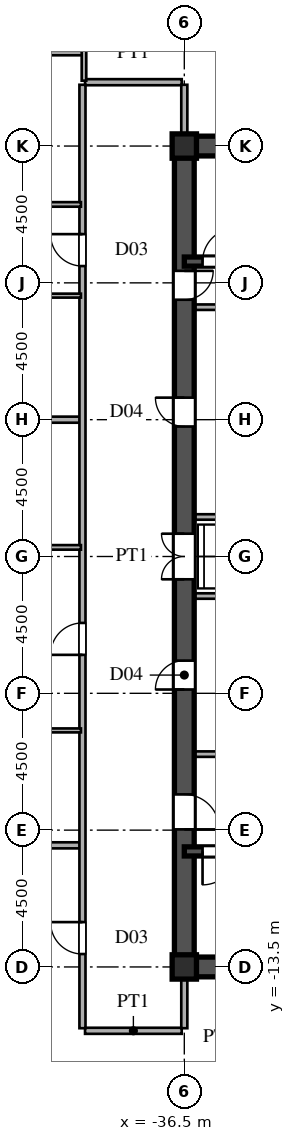
"""IFC4 building model, lengths in metres.
Left out: names, types, materials, properties, quantities, classifications, styles, units other than length and angle.
Written with IfcOpenShell. Run it as: python <this file> out.ifc"""

import sys

from ifc_helpers import new_model, si_unit, direction, frame, frame_2d, origin, origin_2d, place, context, subcontext, project, spatial, rectangle, i_section, extrude, source, transform, mapped, element, fill, save


model = new_model("IFC4")
c1 = context("Model", 3, precision=1e-05, world=origin(), true_north=direction((0.0, 1.0)))
c2 = subcontext(c1, "Body", "Model", "MODEL_VIEW")
j1 = project(units=[si_unit("LENGTHUNIT", "METRE"), si_unit("PLANEANGLEUNIT", "RADIAN")], contexts=[c1])
p1 = place(None, origin())
s1 = spatial("IfcSite", under=j1, at=p1, CompositionType="ELEMENT")
p2 = place(p1, origin())
s2 = spatial("IfcBuilding", under=s1, at=p2, CompositionType="ELEMENT")
p3 = place(p2, frame((0.0, 0.0, 83.7)))
s3 = spatial("IfcBuildingStorey", under=s2, at=p3, CompositionType="ELEMENT", Elevation=83.7)
m1 = source(origin(), c2, "Body", "SweptSolid", [
    extrude(i_section(OverallWidth=0.8, OverallDepth=0.8, WebThickness=0.032, FlangeThickness=0.05, at=origin_2d()), origin(), (0.0, 0.0, 1.0), 3.6),
])
for number, where, z_axis, x_axis in (
    (1, (-36.5, -13.5, 0.0), (0.0, 0.0, 1.0), (1.0, 0.0, 0.0)),
    (2, (-36.5, 13.5, 0.0), (0.0, 0.0, 1.0), (1.0, 0.0, 0.0)),
):
    element("IfcColumn", number, at=place(p3, frame(where, z_axis=z_axis, x_axis=x_axis)), inside=s3, PredefinedType="COLUMN", context=c2, shape_type="MappedRepresentation", body=[
        mapped(m1, transform((0.0, 0.0, 0.0), scale=1.0)),
    ])
for number, where, z_axis, x_axis in (
    (3, (-36.5, -13.5, 0.0), (0.0, 0.0, 1.0), (1.0, 0.0, 0.0)),
    (4, (-36.5, 13.5, 0.0), (0.0, 0.0, 1.0), (1.0, 0.0, 0.0)),
):
    element("IfcWall", number, at=place(p3, frame(where, z_axis=z_axis, x_axis=x_axis)), inside=s3, PredefinedType="SHEAR", context=c2, shape_type="SweptSolid", body=[
        extrude(rectangle(XDim=9.0, YDim=0.65, at=frame_2d((4.5, 0.0))), origin(), (0.0, 0.0, 1.0), 3.34),
    ])
p4 = place(p3, frame((-36.5, -13.65, 0.0), z_axis=(0.0, 0.0, 1.0), x_axis=(0.0, 1.0, 0.0)))
e5 = element("IfcWall", 5, at=p4, inside=s3, PredefinedType="SHEAR", context=c2, shape_type="SweptSolid", body=[
    extrude(rectangle(XDim=7.15, YDim=0.65, at=frame_2d((3.575, 0.0))), origin(), (0.0, 0.0, 1.0), 3.34),
])
p5 = place(p4, frame((4.675, 0.0, 0.0)))
e6 = element("IfcOpeningElement", 6, at=p5, cuts=e5, PredefinedType="OPENING", context=c2, shape_type="SweptSolid", body=[
    extrude(rectangle(XDim=1.15, YDim=2.2, at=frame_2d((0.575, 1.1))), frame((0.0, 0.335, 0.0), z_axis=(0.0, -1.0, 0.0), x_axis=(1.0, 0.0, 0.0)), (0.0, 0.0, 1.0), 0.67),
])
p6 = place(p3, frame((-36.5, -1.3, 0.0), z_axis=(0.0, 0.0, 1.0), x_axis=(0.0, 1.0, 0.0)))
e7 = element("IfcWall", 7, at=p6, inside=s3, PredefinedType="SHEAR", context=c2, shape_type="SweptSolid", body=[
    extrude(rectangle(XDim=2.6, YDim=0.65, at=frame_2d((1.3, 0.0))), origin(), (0.0, 0.0, 1.0), 3.34),
])
p7 = place(p6, frame((0.55, 0.0, 0.0)))
e8 = element("IfcOpeningElement", 8, at=p7, cuts=e7, PredefinedType="OPENING", context=c2, shape_type="SweptSolid", body=[
    extrude(rectangle(XDim=1.5, YDim=2.3, at=frame_2d((0.75, 1.15))), frame((0.0, 0.335, 0.0), z_axis=(0.0, -1.0, 0.0), x_axis=(1.0, 0.0, 0.0)), (0.0, 0.0, 1.0), 0.67),
])
p8 = place(p3, frame((-36.5, 8.2, 0.0), z_axis=(0.0, 0.0, 1.0), x_axis=(0.0, 1.0, 0.0)))
e9 = element("IfcWall", 9, at=p8, inside=s3, PredefinedType="SHEAR", context=c2, shape_type="SweptSolid", body=[
    extrude(rectangle(XDim=5.45, YDim=0.65, at=frame_2d((2.725, 0.0))), origin(), (0.0, 0.0, 1.0), 3.34),
])
p9 = place(p8, frame((0.245, 0.0, 0.0)))
e10 = element("IfcOpeningElement", 10, at=p9, cuts=e9, PredefinedType="OPENING", context=c2, shape_type="SweptSolid", body=[
    extrude(rectangle(XDim=0.95, YDim=2.15, at=frame_2d((0.475, 1.075))), frame((0.0, 0.335, 0.0), z_axis=(0.0, -1.0, 0.0), x_axis=(1.0, 0.0, 0.0)), (0.0, 0.0, 1.0), 0.67),
])
p10 = place(p3, frame((-36.5, -6.5, 0.0), z_axis=(0.0, 0.0, 1.0), x_axis=(0.0, 1.0, 0.0)))
e11 = element("IfcWall", 11, at=p10, inside=s3, PredefinedType="SHEAR", context=c2, shape_type="SweptSolid", body=[
    extrude(rectangle(XDim=5.2, YDim=0.65, at=frame_2d((2.6, 0.0))), origin(), (0.0, 0.0, 1.0), 3.34),
])
p11 = place(p10, frame((2.125, 0.0, 0.0)))
e12 = element("IfcOpeningElement", 12, at=p11, cuts=e11, PredefinedType="OPENING", context=c2, shape_type="SweptSolid", body=[
    extrude(rectangle(XDim=0.95, YDim=2.15, at=frame_2d((0.475, 1.075))), frame((0.0, 0.335, 0.0), z_axis=(0.0, -1.0, 0.0), x_axis=(1.0, 0.0, 0.0)), (0.0, 0.0, 1.0), 0.67),
])
p12 = place(p3, frame((-36.5, 1.3, 0.0), z_axis=(0.0, 0.0, 1.0), x_axis=(0.0, 1.0, 0.0)))
e13 = element("IfcWall", 13, at=p12, inside=s3, PredefinedType="SHEAR", context=c2, shape_type="SweptSolid", body=[
    extrude(rectangle(XDim=6.9, YDim=0.65, at=frame_2d((3.45, 0.0))), origin(), (0.0, 0.0, 1.0), 3.34),
])
p13 = place(p12, frame((2.975, 0.0, 0.0)))
e14 = element("IfcOpeningElement", 14, at=p13, cuts=e13, PredefinedType="OPENING", context=c2, shape_type="SweptSolid", body=[
    extrude(rectangle(XDim=0.95, YDim=2.15, at=frame_2d((0.475, 1.075))), frame((0.0, 0.335, 0.0), z_axis=(0.0, -1.0, 0.0), x_axis=(1.0, 0.0, 0.0)), (0.0, 0.0, 1.0), 0.67),
])
p14 = place(p3, frame((-36.5, -9.7, 0.0), z_axis=(0.0, 0.0, 1.0), x_axis=(1.0, 0.0, 0.0)))
e15 = element("IfcWall", 15, at=p14, inside=s3, PredefinedType="SHEAR", context=c2, shape_type="SweptSolid", body=[
    extrude(rectangle(XDim=9.0, YDim=0.3, at=frame_2d((4.5, 0.0))), origin(), (0.0, 0.0, 1.0), 3.34),
])
p15 = place(p14, frame((0.6, 0.0, 0.0)))
e16 = element("IfcOpeningElement", 16, at=p15, cuts=e15, PredefinedType="OPENING", context=c2, shape_type="SweptSolid", body=[
    extrude(rectangle(XDim=1.1, YDim=2.2, at=frame_2d((0.55, 1.1))), frame((0.0, 0.16, 0.0), z_axis=(0.0, -1.0, 0.0), x_axis=(1.0, 0.0, 0.0)), (0.0, 0.0, 1.0), 0.32),
])
p16 = place(p3, frame((-36.5, 9.7, 0.0), z_axis=(0.0, 0.0, 1.0), x_axis=(1.0, 0.0, 0.0)))
e17 = element("IfcWall", 17, at=p16, inside=s3, PredefinedType="SHEAR", context=c2, shape_type="SweptSolid", body=[
    extrude(rectangle(XDim=9.0, YDim=0.3, at=frame_2d((4.5, 0.0))), origin(), (0.0, 0.0, 1.0), 3.34),
])
p17 = place(p16, frame((0.6, 0.0, 0.0)))
e18 = element("IfcOpeningElement", 18, at=p17, cuts=e17, PredefinedType="OPENING", context=c2, shape_type="SweptSolid", body=[
    extrude(rectangle(XDim=1.1, YDim=2.2, at=frame_2d((0.55, 1.1))), frame((0.0, 0.16, 0.0), z_axis=(0.0, -1.0, 0.0), x_axis=(1.0, 0.0, 0.0)), (0.0, 0.0, 1.0), 0.32),
])
for number, where, z_axis, x_axis in (
    (19, (-36.15, -6.5, 0.0), (0.0, 0.0, 1.0), (1.0, 0.0, 0.0)),
    (20, (-36.15, 8.2, 0.0), (0.0, 0.0, 1.0), (1.0, 0.0, 0.0)),
):
    element("IfcWall", number, at=place(p3, frame(where, z_axis=z_axis, x_axis=x_axis)), inside=s3, PredefinedType="PARTITIONING", context=c2, shape_type="SweptSolid", body=[
        extrude(rectangle(XDim=5.7, YDim=0.18, at=frame_2d((2.85, 0.0))), origin(), (0.0, 0.0, 1.0), 3.34),
    ])
for number, where, z_axis, x_axis in (
    (21, (-36.15, -1.3, 0.0), (0.0, 0.0, 1.0), (1.0, 0.0, 0.0)),
    (22, (-36.15, 1.3, 0.0), (0.0, 0.0, 1.0), (1.0, 0.0, 0.0)),
):
    element("IfcWall", number, at=place(p3, frame(where, z_axis=z_axis, x_axis=x_axis)), inside=s3, PredefinedType="PARTITIONING", context=c2, shape_type="SweptSolid", body=[
        extrude(rectangle(XDim=2.95, YDim=0.18, at=frame_2d((1.475, 0.0))), origin(), (0.0, 0.0, 1.0), 3.34),
    ])
p18 = place(p3, frame((-39.765, -15.6, 0.0), z_axis=(0.0, 0.0, 1.0), x_axis=(1.0, 0.0, 0.0)))
e23 = element("IfcWall", 23, at=p18, inside=s3, PredefinedType="PARTITIONING", context=c2, shape_type="SweptSolid", body=[
    extrude(rectangle(XDim=3.18, YDim=0.2, at=frame_2d((1.59, 0.0))), origin(), (0.0, 0.0, 1.0), 3.34),
])
p19 = place(p3, frame((-66.568, -9.5, 0.0), z_axis=(0.0, 0.0, 1.0), x_axis=(1.0, 0.0, 0.0)))
e24 = element("IfcWall", 24, at=p19, inside=s3, PredefinedType="PARTITIONING", context=c2, shape_type="SweptSolid", body=[
    extrude(rectangle(XDim=26.638, YDim=0.2, at=frame_2d((13.319, 0.0))), origin(), (0.0, 0.0, 1.0), 3.34),
])
p20 = place(p3, frame((-45.45, -5.72, 0.0), z_axis=(0.0, 0.0, 1.0), x_axis=(1.0, 0.0, 0.0)))
e25 = element("IfcWall", 25, at=p20, inside=s3, PredefinedType="PARTITIONING", context=c2, shape_type="SweptSolid", body=[
    extrude(rectangle(XDim=5.55, YDim=0.13, at=frame_2d((2.775, 0.0))), origin(), (0.0, 0.0, 1.0), 3.34),
])
p21 = place(p20, frame((2.335, 0.0, 0.0)))
e26 = element("IfcOpeningElement", 26, at=p21, cuts=e25, PredefinedType="OPENING", context=c2, shape_type="SweptSolid", body=[
    extrude(rectangle(XDim=0.88, YDim=2.1, at=frame_2d((0.44, 1.05))), frame((0.0, 0.075, 0.0), z_axis=(0.0, -1.0, 0.0), x_axis=(1.0, 0.0, 0.0)), (0.0, 0.0, 1.0), 0.15),
])
p22 = place(p3, frame((-45.45, 0.3, 0.0), z_axis=(0.0, 0.0, 1.0), x_axis=(1.0, 0.0, 0.0)))
e27 = element("IfcWall", 27, at=p22, inside=s3, PredefinedType="PARTITIONING", context=c2, shape_type="SweptSolid", body=[
    extrude(rectangle(XDim=5.55, YDim=0.15, at=frame_2d((2.775, 0.0))), origin(), (0.0, 0.0, 1.0), 3.34),
])
p23 = place(p22, frame((2.3, 0.0, 0.0)))
e28 = element("IfcOpeningElement", 28, at=p23, cuts=e27, PredefinedType="OPENING", context=c2, shape_type="SweptSolid", body=[
    extrude(rectangle(XDim=0.95, YDim=2.15, at=frame_2d((0.475, 1.075))), frame((0.0, 0.085, 0.0), z_axis=(0.0, -1.0, 0.0), x_axis=(1.0, 0.0, 0.0)), (0.0, 0.0, 1.0), 0.17),
])
p24 = place(p3, frame((-54.52, 4.5, 0.0), z_axis=(0.0, 0.0, 1.0), x_axis=(1.0, 0.0, 0.0)))
e29 = element("IfcWall", 29, at=p24, inside=s3, PredefinedType="PARTITIONING", context=c2, shape_type="SweptSolid", body=[
    extrude(rectangle(XDim=14.59, YDim=0.2, at=frame_2d((7.295, 0.0))), origin(), (0.0, 0.0, 1.0), 2.44),
])
p25 = place(p3, frame((-45.45, 8.58, 0.0), z_axis=(0.0, 0.0, 1.0), x_axis=(1.0, 0.0, 0.0)))
e30 = element("IfcWall", 30, at=p25, inside=s3, PredefinedType="PARTITIONING", context=c2, shape_type="SweptSolid", body=[
    extrude(rectangle(XDim=5.55, YDim=0.13, at=frame_2d((2.775, 0.0))), origin(), (0.0, 0.0, 1.0), 3.34),
])
p26 = place(p25, frame((2.335, 0.0, 0.0)))
e31 = element("IfcOpeningElement", 31, at=p26, cuts=e30, PredefinedType="OPENING", context=c2, shape_type="SweptSolid", body=[
    extrude(rectangle(XDim=0.88, YDim=2.1, at=frame_2d((0.44, 1.05))), frame((0.0, 0.075, 0.0), z_axis=(0.0, -1.0, 0.0), x_axis=(1.0, 0.0, 0.0)), (0.0, 0.0, 1.0), 0.15),
])
p27 = place(p3, frame((-45.45, 11.58, 0.0), z_axis=(0.0, 0.0, 1.0), x_axis=(1.0, 0.0, 0.0)))
e32 = element("IfcWall", 32, at=p27, inside=s3, PredefinedType="PARTITIONING", context=c2, shape_type="SweptSolid", body=[
    extrude(rectangle(XDim=5.55, YDim=0.15, at=frame_2d((2.775, 0.0))), origin(), (0.0, 0.0, 1.0), 3.34),
])
p28 = place(p27, frame((2.3, 0.0, 0.0)))
e33 = element("IfcOpeningElement", 33, at=p28, cuts=e32, PredefinedType="OPENING", context=c2, shape_type="SweptSolid", body=[
    extrude(rectangle(XDim=0.95, YDim=2.15, at=frame_2d((0.475, 1.075))), frame((0.0, 0.085, 0.0), z_axis=(0.0, -1.0, 0.0), x_axis=(1.0, 0.0, 0.0)), (0.0, 0.0, 1.0), 0.17),
])
p29 = place(p3, frame((-39.765, 15.6, 0.0), z_axis=(0.0, 0.0, 1.0), x_axis=(1.0, 0.0, 0.0)))
e34 = element("IfcWall", 34, at=p29, inside=s3, PredefinedType="PARTITIONING", context=c2, shape_type="SweptSolid", body=[
    extrude(rectangle(XDim=3.18, YDim=0.2, at=frame_2d((1.59, 0.0))), origin(), (0.0, 0.0, 1.0), 3.34),
])
p30 = place(p3, frame((-45.45, 16.56, 0.0), z_axis=(0.0, 0.0, 1.0), x_axis=(1.0, 0.0, 0.0)))
e35 = element("IfcWall", 35, at=p30, inside=s3, PredefinedType="PARTITIONING", context=c2, shape_type="SweptSolid", body=[
    extrude(rectangle(XDim=5.6, YDim=0.15, at=frame_2d((2.8, 0.0))), origin(), (0.0, 0.0, 1.0), 3.34),
])
p31 = place(p3, frame((-39.85, -15.515, 0.0), z_axis=(0.0, 0.0, 1.0), x_axis=(0.0, 1.0, 0.0)))
e36 = element("IfcWall", 36, at=p31, inside=s3, PredefinedType="PARTITIONING", context=c2, shape_type="SweptSolid", body=[
    extrude(rectangle(XDim=31.03, YDim=0.2, at=frame_2d((15.515, 0.0))), origin(), (0.0, 0.0, 1.0), 3.34),
])
p32 = place(p31, frame((2.44, 0.0, 0.0)))
e37 = element("IfcOpeningElement", 37, at=p32, cuts=e36, PredefinedType="OPENING", context=c2, shape_type="SweptSolid", body=[
    extrude(rectangle(XDim=1.05, YDim=2.25, at=frame_2d((0.525, 1.125))), frame((0.0, 0.11, 0.0), z_axis=(0.0, -1.0, 0.0), x_axis=(1.0, 0.0, 0.0)), (0.0, 0.0, 1.0), 0.22),
])
p33 = place(p31, frame((12.28, 0.0, 0.0)))
e38 = element("IfcOpeningElement", 38, at=p33, cuts=e36, PredefinedType="OPENING", context=c2, shape_type="SweptSolid", body=[
    extrude(rectangle(XDim=1.05, YDim=2.25, at=frame_2d((0.525, 1.125))), frame((0.0, 0.11, 0.0), z_axis=(0.0, -1.0, 0.0), x_axis=(1.0, 0.0, 0.0)), (0.0, 0.0, 1.0), 0.22),
])
p34 = place(p31, frame((25.067, 0.0, 0.0)))
e39 = element("IfcOpeningElement", 39, at=p34, cuts=e36, PredefinedType="OPENING", context=c2, shape_type="SweptSolid", body=[
    extrude(rectangle(XDim=1.05, YDim=2.25, at=frame_2d((0.525, 1.125))), frame((0.0, 0.11, 0.0), z_axis=(0.0, -1.0, 0.0), x_axis=(1.0, 0.0, 0.0)), (0.0, 0.0, 1.0), 0.22),
])
p35 = place(p3, frame((-39.8, 15.65, 0.0), z_axis=(0.0, 0.0, 1.0), x_axis=(0.0, 1.0, 0.0)))
e40 = element("IfcWall", 40, at=p35, inside=s3, PredefinedType="PARTITIONING", context=c2, shape_type="SweptSolid", body=[
    extrude(rectangle(XDim=5.925, YDim=0.15, at=frame_2d((2.962, 0.0))), origin(), (0.0, 0.0, 1.0), 3.34),
])
p36 = place(p35, frame((1.904, 0.0, 0.0)))
e41 = element("IfcOpeningElement", 41, at=p36, cuts=e40, PredefinedType="OPENING", context=c2, shape_type="SweptSolid", body=[
    extrude(rectangle(XDim=0.95, YDim=2.15, at=frame_2d((0.475, 1.075))), frame((0.0, 0.085, 0.0), z_axis=(0.0, -1.0, 0.0), x_axis=(1.0, 0.0, 0.0)), (0.0, 0.0, 1.0), 0.17),
])
for number, where, z_axis, x_axis in (
    (42, (-36.5, -15.515, 0.0), (0.0, 0.0, 1.0), (0.0, 1.0, 0.0)),
    (43, (-36.5, 13.83, 0.0), (0.0, 0.0, 1.0), (0.0, 1.0, 0.0)),
):
    element("IfcWall", number, at=place(p3, frame(where, z_axis=z_axis, x_axis=x_axis)), inside=s3, PredefinedType="PARTITIONING", context=c2, shape_type="SweptSolid", body=[
        extrude(rectangle(XDim=1.685, YDim=0.2, at=frame_2d((0.842, 0.0))), origin(), (0.0, 0.0, 1.0), 2.44),
    ])
m2 = source(origin(), c2, "Body", "SweptSolid", [
    extrude(rectangle(XDim=1.15, YDim=2.2, at=frame_2d((0.575, 1.1))), frame((0.0, 0.025, 0.0), z_axis=(0.0, -1.0, 0.0), x_axis=(1.0, 0.0, 0.0)), (0.0, 0.0, 1.0), 0.05),
])
p37 = place(p5, frame((1.15, 0.0, 0.0), z_axis=(0.0, 0.0, 1.0), x_axis=(-1.0, 0.0, 0.0)))
e44 = element("IfcDoor", 44, at=p37, inside=s3, OperationType="SINGLE_SWING_LEFT", PredefinedType="DOOR", context=c2, shape_type="MappedRepresentation", body=[
    mapped(m2, transform((0.0, 0.0, 0.0), scale=1.0)),
])
fill(e6, e44)
m3 = source(origin(), c2, "Body", "SweptSolid", [
    extrude(rectangle(XDim=1.5, YDim=2.3, at=frame_2d((0.75, 1.15))), frame((0.0, 0.025, 0.0), z_axis=(0.0, -1.0, 0.0), x_axis=(1.0, 0.0, 0.0)), (0.0, 0.0, 1.0), 0.05),
])
p38 = place(p7, origin())
e45 = element("IfcDoor", 45, at=p38, inside=s3, OperationType="DOUBLE_SWING_LEFT", PredefinedType="DOOR", context=c2, shape_type="MappedRepresentation", body=[
    mapped(m3, transform((0.0, 0.0, 0.0), scale=1.0)),
])
fill(e8, e45)
m4 = source(origin(), c2, "Body", "SweptSolid", [
    extrude(rectangle(XDim=0.95, YDim=2.15, at=frame_2d((0.475, 1.075))), frame((0.0, 0.025, 0.0), z_axis=(0.0, -1.0, 0.0), x_axis=(1.0, 0.0, 0.0)), (0.0, 0.0, 1.0), 0.05),
])
p39 = place(p9, frame((0.95, 0.0, 0.0), z_axis=(0.0, 0.0, 1.0), x_axis=(-1.0, 0.0, 0.0)))
e46 = element("IfcDoor", 46, at=p39, inside=s3, OperationType="SINGLE_SWING_RIGHT", PredefinedType="DOOR", context=c2, shape_type="MappedRepresentation", body=[
    mapped(m4, transform((0.0, 0.0, 0.0), scale=1.0)),
])
fill(e10, e46)
p40 = place(p11, origin())
e47 = element("IfcDoor", 47, at=p40, inside=s3, OperationType="SINGLE_SWING_LEFT", PredefinedType="DOOR", context=c2, shape_type="MappedRepresentation", body=[
    mapped(m4, transform((0.0, 0.0, 0.0), scale=1.0)),
])
fill(e12, e47)
p41 = place(p13, origin())
e48 = element("IfcDoor", 48, at=p41, inside=s3, OperationType="SINGLE_SWING_RIGHT", PredefinedType="DOOR", context=c2, shape_type="MappedRepresentation", body=[
    mapped(m4, transform((0.0, 0.0, 0.0), scale=1.0)),
])
fill(e14, e48)
m5 = source(origin(), c2, "Body", "SweptSolid", [
    extrude(rectangle(XDim=1.1, YDim=2.2, at=frame_2d((0.55, 1.1))), frame((0.0, 0.025, 0.0), z_axis=(0.0, -1.0, 0.0), x_axis=(1.0, 0.0, 0.0)), (0.0, 0.0, 1.0), 0.05),
])
p42 = place(p15, frame((1.1, 0.0, 0.0), z_axis=(0.0, 0.0, 1.0), x_axis=(-1.0, 0.0, 0.0)))
e49 = element("IfcDoor", 49, at=p42, inside=s3, OperationType="SINGLE_SWING_LEFT", PredefinedType="DOOR", context=c2, shape_type="MappedRepresentation", body=[
    mapped(m5, transform((0.0, 0.0, 0.0), scale=1.0)),
])
fill(e16, e49)
p43 = place(p17, origin())
e50 = element("IfcDoor", 50, at=p43, inside=s3, OperationType="SINGLE_SWING_RIGHT", PredefinedType="DOOR", context=c2, shape_type="MappedRepresentation", body=[
    mapped(m5, transform((0.0, 0.0, 0.0), scale=1.0)),
])
fill(e18, e50)
m6 = source(origin(), c2, "Body", "SweptSolid", [
    extrude(rectangle(XDim=1.05, YDim=2.25, at=frame_2d((0.525, 1.125))), frame((0.0, 0.025, 0.0), z_axis=(0.0, -1.0, 0.0), x_axis=(1.0, 0.0, 0.0)), (0.0, 0.0, 1.0), 0.05),
])
p44 = place(p32, origin())
e51 = element("IfcDoor", 51, at=p44, inside=s3, OperationType="SINGLE_SWING_RIGHT", PredefinedType="DOOR", context=c2, shape_type="MappedRepresentation", body=[
    mapped(m6, transform((0.0, 0.0, 0.0), scale=1.0)),
])
fill(e37, e51)
p45 = place(p33, origin())
e52 = element("IfcDoor", 52, at=p45, inside=s3, OperationType="SINGLE_SWING_LEFT", PredefinedType="DOOR", context=c2, shape_type="MappedRepresentation", body=[
    mapped(m6, transform((0.0, 0.0, 0.0), scale=1.0)),
])
fill(e38, e52)
p46 = place(p34, origin())
e53 = element("IfcDoor", 53, at=p46, inside=s3, OperationType="SINGLE_SWING_RIGHT", PredefinedType="DOOR", context=c2, shape_type="MappedRepresentation", body=[
    mapped(m6, transform((0.0, 0.0, 0.0), scale=1.0)),
])
fill(e39, e53)
save(model, sys.argv[1])
